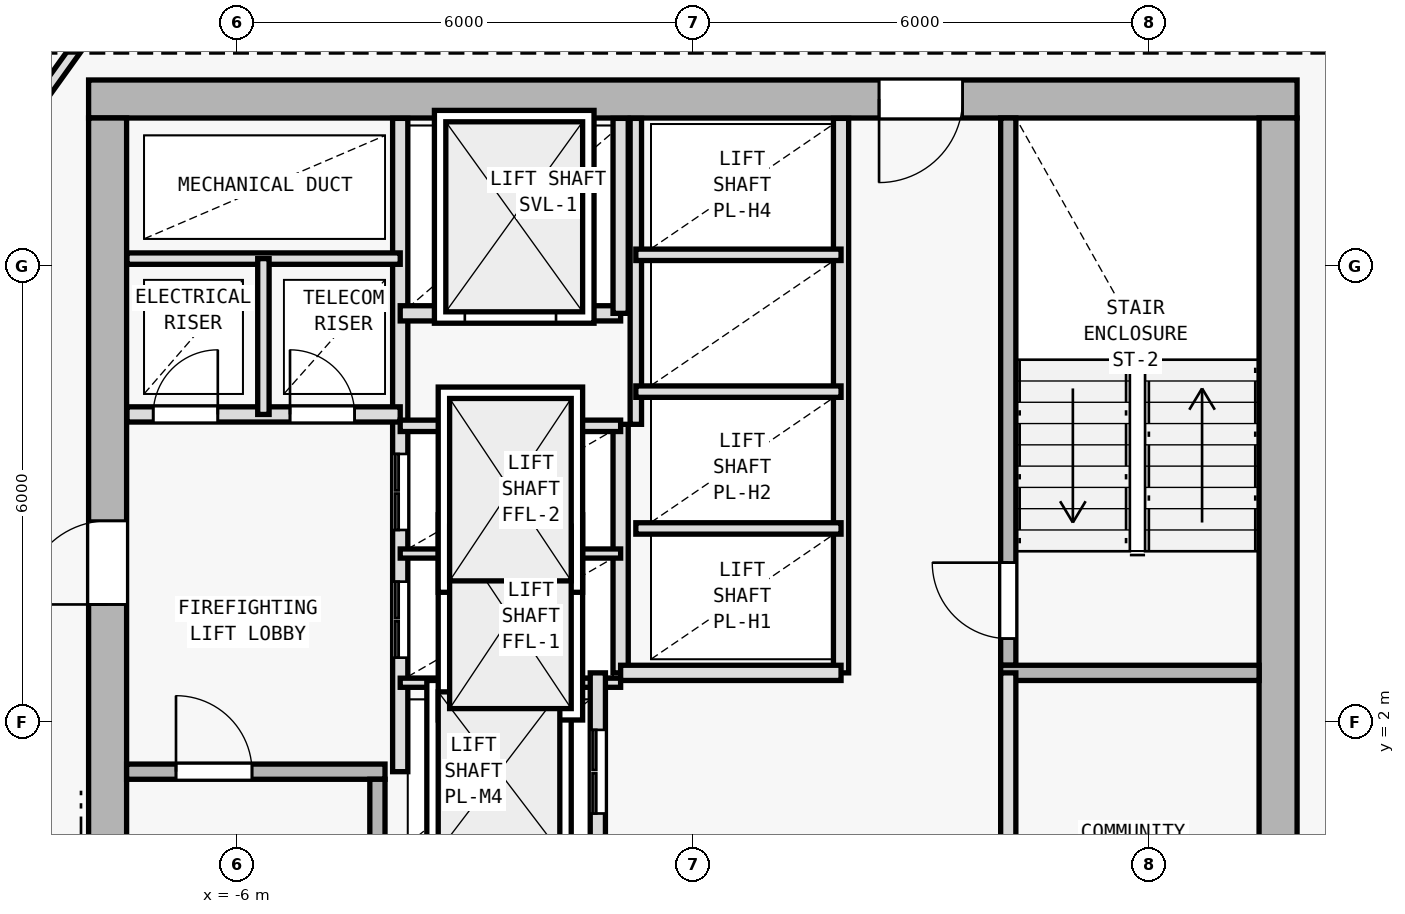
"""IFC4 building model, lengths in metres.
Left out: names, types, materials, properties, quantities, classifications, styles, units other than length and angle.
Written with IfcOpenShell. Run it as: python <this file> out.ifc"""

import sys

from ifc_helpers import new_model, si_unit, direction, frame, frame_2d, origin, origin_2d, place, context, subcontext, project, spatial, rectangle, i_section, extrude, element, fill, save


model = new_model("IFC4")
c1 = context("Model", 3, precision=1e-05, world=origin(), true_north=direction((0.0, 1.0)))
c2 = subcontext(c1, "Body", "Model", "MODEL_VIEW")
j1 = project(units=[si_unit("LENGTHUNIT", "METRE"), si_unit("PLANEANGLEUNIT", "RADIAN")], contexts=[c1])
p1 = place(None, origin())
s1 = spatial("IfcSite", under=j1, at=p1, CompositionType="ELEMENT")
p2 = place(p1, origin())
s2 = spatial("IfcBuilding", under=s1, at=p2, CompositionType="ELEMENT")
p3 = place(p2, frame((0.0, 0.0, 142.2)))
s3 = spatial("IfcBuildingStorey", under=s2, at=p3, CompositionType="ELEMENT", Elevation=142.2)
for number, where, z_axis, x_axis in (
    (1, (7.7, 10.2, 0.0), (0.0, 0.0, 1.0), (1.0, 0.0, 0.0)),
    (2, (-7.7, 10.2, 0.0), (0.0, 0.0, 1.0), (1.0, 0.0, 0.0)),
    (3, (7.7, 0.4, 0.0), (0.0, 0.0, 1.0), (1.0, 0.0, 0.0)),
    (4, (-7.7, 2.0, 0.0), (0.0, 0.0, 1.0), (1.0, 0.0, 0.0)),
):
    element("IfcColumn", number, at=place(p3, frame(where, z_axis=z_axis, x_axis=x_axis)), inside=s3, PredefinedType="COLUMN", context=c2, shape_type="SweptSolid", body=[
        extrude(i_section(OverallWidth=0.404, OverallDepth=0.407, WebThickness=0.017, FlangeThickness=0.028, FilletRadius=0.015, at=origin_2d()), origin(), (0.0, 0.0, 1.0), 3.6),
    ])
p4 = place(p3, frame((7.95, 10.2, 0.0), z_axis=(0.0, 0.0, 1.0), x_axis=(-1.0, 0.0, 0.0)))
e5 = element("IfcWall", 5, at=p4, inside=s3, PredefinedType="SHEAR", context=c2, shape_type="SweptSolid", body=[
    extrude(rectangle(XDim=15.9, YDim=0.5, at=frame_2d((7.95, 0.0))), origin(), (0.0, 0.0, 1.0), 3.35),
])
p5 = place(p4, frame((4.4, 0.0, 0.0)))
e6 = element("IfcOpeningElement", 6, at=p5, cuts=e5, PredefinedType="OPENING", context=c2, shape_type="SweptSolid", body=[
    extrude(rectangle(XDim=1.1, YDim=2.15, at=frame_2d((0.55, 1.075))), frame((0.0, 0.26, 0.0), z_axis=(0.0, -1.0, 0.0), x_axis=(1.0, 0.0, 0.0)), (0.0, 0.0, 1.0), 0.52),
])
p6 = place(p3, frame((-7.7, -9.15, 0.0), z_axis=(0.0, 0.0, 1.0), x_axis=(0.0, 1.0, 0.0)))
e7 = element("IfcWall", 7, at=p6, inside=s3, PredefinedType="SHEAR", context=c2, shape_type="SweptSolid", body=[
    extrude(rectangle(XDim=19.1, YDim=0.5, at=frame_2d((9.55, 0.0))), origin(), (0.0, 0.0, 1.0), 3.35),
])
p7 = place(p6, frame((12.7, 0.0, 0.0)))
e8 = element("IfcOpeningElement", 8, at=p7, cuts=e7, PredefinedType="OPENING", context=c2, shape_type="SweptSolid", body=[
    extrude(rectangle(XDim=1.1, YDim=2.15, at=frame_2d((0.55, 1.075))), frame((0.0, 0.26, 0.0), z_axis=(0.0, -1.0, 0.0), x_axis=(1.0, 0.0, 0.0)), (0.0, 0.0, 1.0), 0.52),
])
p8 = place(p3, frame((7.7, 9.95, 0.0), z_axis=(0.0, 0.0, 1.0), x_axis=(0.0, -1.0, 0.0)))
e9 = element("IfcWall", 9, at=p8, inside=s3, PredefinedType="SHEAR", context=c2, shape_type="SweptSolid", body=[
    extrude(rectangle(XDim=19.1, YDim=0.5, at=frame_2d((9.55, 0.0))), origin(), (0.0, 0.0, 1.0), 3.35),
])
p9 = place(p3, frame((-7.45, 1.35, 0.0), z_axis=(0.0, 0.0, 1.0), x_axis=(1.0, 0.0, 0.0)))
e10 = element("IfcWall", 10, at=p9, inside=s3, PredefinedType="SOLIDWALL", context=c2, shape_type="SweptSolid", body=[
    extrude(rectangle(XDim=3.4, YDim=0.2, at=frame_2d((1.7, 0.0))), origin(), (0.0, 0.0, 1.0), 3.35),
])
p10 = place(p9, frame((0.65, 0.0, 0.0)))
e11 = element("IfcOpeningElement", 11, at=p10, cuts=e10, PredefinedType="OPENING", context=c2, shape_type="SweptSolid", body=[
    extrude(rectangle(XDim=1.0, YDim=2.15, at=frame_2d((0.5, 1.075))), frame((0.0, 0.11, 0.0), z_axis=(0.0, -1.0, 0.0), x_axis=(1.0, 0.0, 0.0)), (0.0, 0.0, 1.0), 0.22),
])
p11 = place(p3, frame((-4.15, -5.95, 0.0), z_axis=(0.0, 0.0, 1.0), x_axis=(0.0, 1.0, 0.0)))
e12 = element("IfcWall", 12, at=p11, inside=s3, PredefinedType="SOLIDWALL", context=c2, shape_type="SweptSolid", body=[
    extrude(rectangle(XDim=7.2, YDim=0.2, at=frame_2d((3.6, 0.0))), origin(), (0.0, 0.0, 1.0), 3.35),
])
p12 = place(p3, frame((-3.85, 1.35, 0.0), z_axis=(0.0, 0.0, 1.0), x_axis=(0.0, 1.0, 0.0)))
e13 = element("IfcWall", 13, at=p12, inside=s3, PredefinedType="SOLIDWALL", context=c2, shape_type="SweptSolid", body=[
    extrude(rectangle(XDim=8.595, YDim=0.2, at=frame_2d((4.297, 0.0))), origin(), (0.0, 0.0, 1.0), 3.35),
])
p13 = place(p12, frame((1.5, 0.0, 0.0)))
e14 = element("IfcOpeningElement", 14, at=p13, cuts=e13, PredefinedType="OPENING", context=c2, shape_type="SweptSolid", body=[
    extrude(rectangle(XDim=1.0, YDim=2.15, at=frame_2d((0.5, 1.075))), frame((0.0, 0.11, 0.0), z_axis=(0.0, -1.0, 0.0), x_axis=(1.0, 0.0, 0.0)), (0.0, 0.0, 1.0), 0.22),
])
p14 = place(p12, frame((3.18, 0.0, 0.0)))
e15 = element("IfcOpeningElement", 15, at=p14, cuts=e13, PredefinedType="OPENING", context=c2, shape_type="SweptSolid", body=[
    extrude(rectangle(XDim=1.0, YDim=2.15, at=frame_2d((0.5, 1.075))), frame((0.0, 0.11, 0.0), z_axis=(0.0, -1.0, 0.0), x_axis=(1.0, 0.0, 0.0)), (0.0, 0.0, 1.0), 0.22),
])
p15 = place(p3, frame((-7.445, 6.05, 0.0), z_axis=(0.0, 0.0, 1.0), x_axis=(1.0, 0.0, 0.0)))
e16 = element("IfcWall", 16, at=p15, inside=s3, PredefinedType="SOLIDWALL", context=c2, shape_type="SweptSolid", body=[
    extrude(rectangle(XDim=3.595, YDim=0.2, at=frame_2d((1.797, 0.0))), origin(), (0.0, 0.0, 1.0), 3.35),
])
p16 = place(p15, frame((0.345, 0.0, 0.0)))
e17 = element("IfcOpeningElement", 17, at=p16, cuts=e16, PredefinedType="OPENING", context=c2, shape_type="SweptSolid", body=[
    extrude(rectangle(XDim=0.85, YDim=2.1, at=frame_2d((0.425, 1.05))), frame((0.0, 0.11, 0.0), z_axis=(0.0, -1.0, 0.0), x_axis=(1.0, 0.0, 0.0)), (0.0, 0.0, 1.0), 0.22),
])
p17 = place(p15, frame((2.145, 0.0, 0.0)))
e18 = element("IfcOpeningElement", 18, at=p17, cuts=e16, PredefinedType="OPENING", context=c2, shape_type="SweptSolid", body=[
    extrude(rectangle(XDim=0.85, YDim=2.1, at=frame_2d((0.425, 1.05))), frame((0.0, 0.11, 0.0), z_axis=(0.0, -1.0, 0.0), x_axis=(1.0, 0.0, 0.0)), (0.0, 0.0, 1.0), 0.22),
])
p18 = place(p3, frame((-7.445, 8.1, 0.0), z_axis=(0.0, 0.0, 1.0), x_axis=(1.0, 0.0, 0.0)))
e19 = element("IfcWall", 19, at=p18, inside=s3, PredefinedType="PARTITIONING", context=c2, shape_type="SweptSolid", body=[
    extrude(rectangle(XDim=3.595, YDim=0.15, at=frame_2d((1.797, 0.0))), origin(), (0.0, 0.0, 1.0), 3.35),
])
p19 = place(p3, frame((-5.65, 6.05, 0.0), z_axis=(0.0, 0.0, 1.0), x_axis=(0.0, 1.0, 0.0)))
e20 = element("IfcWall", 20, at=p19, inside=s3, PredefinedType="PARTITIONING", context=c2, shape_type="SweptSolid", body=[
    extrude(rectangle(XDim=2.05, YDim=0.15, at=frame_2d((1.025, 0.0))), origin(), (0.0, 0.0, 1.0), 3.35),
])
p20 = place(p3, frame((4.15, 2.75, 0.0), z_axis=(0.0, 0.0, 1.0), x_axis=(0.0, 1.0, 0.0)))
e21 = element("IfcWall", 21, at=p20, inside=s3, PredefinedType="SOLIDWALL", context=c2, shape_type="SweptSolid", body=[
    extrude(rectangle(XDim=7.2, YDim=0.2, at=frame_2d((3.6, 0.0))), origin(), (0.0, 0.0, 1.0), 3.35),
])
p21 = place(p20, frame((0.35, 0.0, 0.0)))
e22 = element("IfcOpeningElement", 22, at=p21, cuts=e21, PredefinedType="OPENING", context=c2, shape_type="SweptSolid", body=[
    extrude(rectangle(XDim=1.0, YDim=2.15, at=frame_2d((0.5, 1.075))), frame((0.0, 0.11, 0.0), z_axis=(0.0, -1.0, 0.0), x_axis=(1.0, 0.0, 0.0)), (0.0, 0.0, 1.0), 0.22),
])
p22 = place(p3, frame((4.05, 2.65, 0.0), z_axis=(0.0, 0.0, 1.0), x_axis=(1.0, 0.0, 0.0)))
e23 = element("IfcWall", 23, at=p22, inside=s3, PredefinedType="SOLIDWALL", context=c2, shape_type="SweptSolid", body=[
    extrude(rectangle(XDim=3.4, YDim=0.2, at=frame_2d((1.7, 0.0))), origin(), (0.0, 0.0, 1.0), 3.35),
])
p23 = place(p3, frame((-0.95, 2.65, 0.0), z_axis=(0.0, 0.0, 1.0), x_axis=(0.0, 1.0, 0.0)))
e24 = element("IfcWall", 24, at=p23, inside=s3, PredefinedType="SOLIDWALL", context=c2, shape_type="SweptSolid", body=[
    extrude(rectangle(XDim=3.27, YDim=0.2, at=frame_2d((1.635, 0.0))), origin(), (0.0, 0.0, 1.0), 3.35),
])
for number, where, z_axis, x_axis in (
    (25, (-3.85, 2.52, 0.0), (0.0, 0.0, 1.0), (1.0, 0.0, 0.0)),
    (26, (-3.85, 4.22, 0.0), (0.0, 0.0, 1.0), (1.0, 0.0, 0.0)),
):
    element("IfcWall", number, at=place(p3, frame(where, z_axis=z_axis, x_axis=x_axis)), inside=s3, PredefinedType="PARTITIONING", context=c2, shape_type="SweptSolid", body=[
        extrude(rectangle(XDim=2.9, YDim=0.12, at=frame_2d((1.45, 0.0))), origin(), (0.0, 0.0, 1.0), 3.35),
    ])
p24 = place(p3, frame((-3.85, 5.9, 0.0), z_axis=(0.0, 0.0, 1.0), x_axis=(1.0, 0.0, 0.0)))
e27 = element("IfcWall", 27, at=p24, inside=s3, PredefinedType="PARTITIONING", context=c2, shape_type="SweptSolid", body=[
    extrude(rectangle(XDim=2.9, YDim=0.15, at=frame_2d((1.45, 0.0))), origin(), (0.0, 0.0, 1.0), 3.35),
])
p25 = place(p3, frame((-3.85, 7.38, 0.0), z_axis=(0.0, 0.0, 1.0), x_axis=(1.0, 0.0, 0.0)))
e28 = element("IfcWall", 28, at=p25, inside=s3, PredefinedType="SOLIDWALL", context=c2, shape_type="SweptSolid", body=[
    extrude(rectangle(XDim=2.9, YDim=0.2, at=frame_2d((1.45, 0.0))), origin(), (0.0, 0.0, 1.0), 3.35),
])
p26 = place(p25, frame((0.85, 0.0, 0.0)))
e29 = element("IfcOpeningElement", 29, at=p26, cuts=e28, PredefinedType="OPENING", context=c2, shape_type="SweptSolid", body=[
    extrude(rectangle(XDim=1.2, YDim=2.2, at=frame_2d((0.6, 1.1))), frame((0.0, 0.11, 0.0), z_axis=(0.0, -1.0, 0.0), x_axis=(1.0, 0.0, 0.0)), (0.0, 0.0, 1.0), 0.22),
])
p27 = place(p3, frame((-0.95, 7.38, 0.0), z_axis=(0.0, 0.0, 1.0), x_axis=(0.0, 1.0, 0.0)))
e30 = element("IfcWall", 30, at=p27, inside=s3, PredefinedType="SOLIDWALL", context=c2, shape_type="SweptSolid", body=[
    extrude(rectangle(XDim=2.565, YDim=0.2, at=frame_2d((1.283, 0.0))), origin(), (0.0, 0.0, 1.0), 3.35),
])
p28 = place(p3, frame((4.15, -6.05, 0.0), z_axis=(0.0, 0.0, 1.0), x_axis=(0.0, 1.0, 0.0)))
e31 = element("IfcWall", 31, at=p28, inside=s3, PredefinedType="SOLIDWALL", context=c2, shape_type="SweptSolid", body=[
    extrude(rectangle(XDim=8.7, YDim=0.2, at=frame_2d((4.35, 0.0))), origin(), (0.0, 0.0, 1.0), 3.35),
])
p29 = place(p28, frame((3.6, 0.0, 0.0)))
e32 = element("IfcOpeningElement", 32, at=p29, cuts=e31, PredefinedType="OPENING", context=c2, shape_type="SweptSolid", body=[
    extrude(rectangle(XDim=0.95, YDim=2.1, at=frame_2d((0.475, 1.05))), frame((0.0, 0.11, 0.0), z_axis=(0.0, -1.0, 0.0), x_axis=(1.0, 0.0, 0.0)), (0.0, 0.0, 1.0), 0.22),
])
p30 = place(p3, frame((-1.25, -6.05, 0.0), z_axis=(0.0, 0.0, 1.0), x_axis=(0.0, 1.0, 0.0)))
e33 = element("IfcWall", 33, at=p30, inside=s3, PredefinedType="SOLIDWALL", context=c2, shape_type="SweptSolid", body=[
    extrude(rectangle(XDim=8.7, YDim=0.2, at=frame_2d((4.35, 0.0))), origin(), (0.0, 0.0, 1.0), 3.35),
])
p31 = place(p30, frame((0.55, 0.0, 0.0)))
e34 = element("IfcOpeningElement", 34, at=p31, cuts=e33, PredefinedType="OPENING", context=c2, shape_type="SweptSolid", body=[
    extrude(rectangle(XDim=1.1, YDim=2.15, at=frame_2d((0.55, 1.075))), frame((0.0, 0.11, 0.0), z_axis=(0.0, -1.0, 0.0), x_axis=(1.0, 0.0, 0.0)), (0.0, 0.0, 1.0), 0.22),
])
p32 = place(p30, frame((2.65, 0.0, 0.0)))
e35 = element("IfcOpeningElement", 35, at=p32, cuts=e33, PredefinedType="OPENING", context=c2, shape_type="SweptSolid", body=[
    extrude(rectangle(XDim=1.1, YDim=2.15, at=frame_2d((0.55, 1.075))), frame((0.0, 0.11, 0.0), z_axis=(0.0, -1.0, 0.0), x_axis=(1.0, 0.0, 0.0)), (0.0, 0.0, 1.0), 0.22),
])
p33 = place(p30, frame((4.75, 0.0, 0.0)))
e36 = element("IfcOpeningElement", 36, at=p33, cuts=e33, PredefinedType="OPENING", context=c2, shape_type="SweptSolid", body=[
    extrude(rectangle(XDim=1.1, YDim=2.15, at=frame_2d((0.55, 1.075))), frame((0.0, 0.11, 0.0), z_axis=(0.0, -1.0, 0.0), x_axis=(1.0, 0.0, 0.0)), (0.0, 0.0, 1.0), 0.22),
])
p34 = place(p30, frame((6.85, 0.0, 0.0)))
e37 = element("IfcOpeningElement", 37, at=p34, cuts=e33, PredefinedType="OPENING", context=c2, shape_type="SweptSolid", body=[
    extrude(rectangle(XDim=1.1, YDim=2.15, at=frame_2d((0.55, 1.075))), frame((0.0, 0.11, 0.0), z_axis=(0.0, -1.0, 0.0), x_axis=(1.0, 0.0, 0.0)), (0.0, 0.0, 1.0), 0.22),
])
p35 = place(p3, frame((1.95, 2.65, 0.0), z_axis=(0.0, 0.0, 1.0), x_axis=(0.0, 1.0, 0.0)))
e38 = element("IfcWall", 38, at=p35, inside=s3, PredefinedType="SOLIDWALL", context=c2, shape_type="SweptSolid", body=[
    extrude(rectangle(XDim=7.295, YDim=0.2, at=frame_2d((3.647, 0.0))), origin(), (0.0, 0.0, 1.0), 3.35),
])
p36 = place(p3, frame((-0.95, 2.65, 0.0), z_axis=(0.0, 0.0, 1.0), x_axis=(1.0, 0.0, 0.0)))
e39 = element("IfcWall", 39, at=p36, inside=s3, PredefinedType="SOLIDWALL", context=c2, shape_type="SweptSolid", body=[
    extrude(rectangle(XDim=2.9, YDim=0.2, at=frame_2d((1.45, 0.0))), origin(), (0.0, 0.0, 1.0), 3.35),
])
p37 = place(p3, frame((-0.75, 5.92, 0.0), z_axis=(0.0, 0.0, 1.0), x_axis=(0.0, 1.0, 0.0)))
e40 = element("IfcWall", 40, at=p37, inside=s3, PredefinedType="PARTITIONING", context=c2, shape_type="SweptSolid", body=[
    extrude(rectangle(XDim=4.025, YDim=0.15, at=frame_2d((2.013, 0.0))), origin(), (0.0, 0.0, 1.0), 3.35),
])
for number, where, z_axis, x_axis in (
    (41, (-0.75, 4.55, 0.0), (0.0, 0.0, 1.0), (1.0, 0.0, 0.0)),
    (42, (-0.75, 6.35, 0.0), (0.0, 0.0, 1.0), (1.0, 0.0, 0.0)),
    (43, (-0.75, 8.15, 0.0), (0.0, 0.0, 1.0), (1.0, 0.0, 0.0)),
):
    element("IfcWall", number, at=place(p3, frame(where, z_axis=z_axis, x_axis=x_axis)), inside=s3, PredefinedType="PARTITIONING", context=c2, shape_type="SweptSolid", body=[
        extrude(rectangle(XDim=2.7, YDim=0.15, at=frame_2d((1.35, 0.0))), origin(), (0.0, 0.0, 1.0), 3.35),
    ])
p38 = place(p3, frame((-9.86, 8.426, 0.0), z_axis=(0.0, 0.0, 1.0), x_axis=(0.582449511476, 0.812866881218, 0.0)))
e44 = element("IfcWall", 44, at=p38, inside=s3, PredefinedType="PARTITIONING", context=c2, shape_type="SweptSolid", body=[
    extrude(rectangle(XDim=4.84, YDim=0.15, at=frame_2d((2.42, 0.0))), origin(), (0.0, 0.0, 1.0), 2.965),
])
p39 = place(p3, frame((7.023, 12.36, 0.0), z_axis=(0.0, 0.0, 1.0), x_axis=(0.84376480085, -0.536713108511, 0.0)))
e45 = element("IfcWall", 45, at=p39, inside=s3, PredefinedType="PARTITIONING", context=c2, shape_type="SweptSolid", body=[
    extrude(rectangle(XDim=7.297, YDim=0.15, at=frame_2d((3.648, 0.0))), origin(), (0.0, 0.0, 1.0), 2.885),
])
p40 = place(p39, frame((3.091, 0.0, 0.0)))
e46 = element("IfcOpeningElement", 46, at=p40, cuts=e45, PredefinedType="OPENING", context=c2, shape_type="SweptSolid", body=[
    extrude(rectangle(XDim=0.9, YDim=2.1, at=frame_2d((0.45, 1.05))), frame((0.0, 0.085, 0.0), z_axis=(0.0, -1.0, 0.0), x_axis=(1.0, 0.0, 0.0)), (0.0, 0.0, 1.0), 0.17),
])
p41 = place(p7, origin())
e47 = element("IfcDoor", 47, at=p41, inside=s3, OperationType="SINGLE_SWING_LEFT", PredefinedType="DOOR", context=c2, shape_type="SweptSolid", body=[
    extrude(rectangle(XDim=1.1, YDim=2.15, at=frame_2d((0.55, 1.075))), frame((0.0, 0.025, 0.0), z_axis=(0.0, -1.0, 0.0), x_axis=(1.0, 0.0, 0.0)), (0.0, 0.0, 1.0), 0.05),
])
fill(e8, e47)
p42 = place(p5, origin())
e48 = element("IfcDoor", 48, at=p42, inside=s3, OperationType="SINGLE_SWING_RIGHT", PredefinedType="DOOR", context=c2, shape_type="SweptSolid", body=[
    extrude(rectangle(XDim=1.1, YDim=2.15, at=frame_2d((0.55, 1.075))), frame((0.0, 0.025, 0.0), z_axis=(0.0, -1.0, 0.0), x_axis=(1.0, 0.0, 0.0)), (0.0, 0.0, 1.0), 0.05),
])
fill(e6, e48)
p43 = place(p10, origin())
e49 = element("IfcDoor", 49, at=p43, inside=s3, OperationType="SINGLE_SWING_LEFT", PredefinedType="DOOR", context=c2, shape_type="SweptSolid", body=[
    extrude(rectangle(XDim=1.0, YDim=2.15, at=frame_2d((0.5, 1.075))), frame((0.0, 0.025, 0.0), z_axis=(0.0, -1.0, 0.0), x_axis=(1.0, 0.0, 0.0)), (0.0, 0.0, 1.0), 0.05),
])
fill(e11, e49)
p44 = place(p16, origin())
e50 = element("IfcDoor", 50, at=p44, inside=s3, OperationType="SINGLE_SWING_RIGHT", PredefinedType="DOOR", context=c2, shape_type="SweptSolid", body=[
    extrude(rectangle(XDim=0.85, YDim=2.1, at=frame_2d((0.425, 1.05))), frame((0.0, 0.025, 0.0), z_axis=(0.0, -1.0, 0.0), x_axis=(1.0, 0.0, 0.0)), (0.0, 0.0, 1.0), 0.05),
])
fill(e17, e50)
p45 = place(p17, origin())
e51 = element("IfcDoor", 51, at=p45, inside=s3, OperationType="SINGLE_SWING_LEFT", PredefinedType="DOOR", context=c2, shape_type="SweptSolid", body=[
    extrude(rectangle(XDim=0.85, YDim=2.1, at=frame_2d((0.425, 1.05))), frame((0.0, 0.025, 0.0), z_axis=(0.0, -1.0, 0.0), x_axis=(1.0, 0.0, 0.0)), (0.0, 0.0, 1.0), 0.05),
])
fill(e18, e51)
p46 = place(p21, origin())
e52 = element("IfcDoor", 52, at=p46, inside=s3, OperationType="SINGLE_SWING_RIGHT", PredefinedType="DOOR", context=c2, shape_type="SweptSolid", body=[
    extrude(rectangle(XDim=1.0, YDim=2.15, at=frame_2d((0.5, 1.075))), frame((0.0, 0.025, 0.0), z_axis=(0.0, -1.0, 0.0), x_axis=(1.0, 0.0, 0.0)), (0.0, 0.0, 1.0), 0.05),
])
fill(e22, e52)
p47 = place(p26, origin())
e53 = element("IfcDoor", 53, at=p47, inside=s3, OperationType="DOUBLE_DOOR_SLIDING", PredefinedType="DOOR", context=c2, shape_type="SweptSolid", body=[
    extrude(rectangle(XDim=1.2, YDim=2.2, at=frame_2d((0.6, 1.1))), frame((0.0, 0.025, 0.0), z_axis=(0.0, -1.0, 0.0), x_axis=(1.0, 0.0, 0.0)), (0.0, 0.0, 1.0), 0.05),
])
fill(e29, e53)
p48 = place(p34, origin())
e54 = element("IfcDoor", 54, at=p48, inside=s3, OperationType="DOUBLE_DOOR_SLIDING", PredefinedType="DOOR", context=c2, shape_type="SweptSolid", body=[
    extrude(rectangle(XDim=1.1, YDim=2.15, at=frame_2d((0.55, 1.075))), frame((0.0, 0.025, 0.0), z_axis=(0.0, -1.0, 0.0), x_axis=(1.0, 0.0, 0.0)), (0.0, 0.0, 1.0), 0.05),
])
fill(e37, e54)
p49 = place(p13, origin())
e55 = element("IfcDoor", 55, at=p49, inside=s3, OperationType="DOUBLE_DOOR_SLIDING", PredefinedType="DOOR", context=c2, shape_type="SweptSolid", body=[
    extrude(rectangle(XDim=1.0, YDim=2.15, at=frame_2d((0.5, 1.075))), frame((0.0, 0.025, 0.0), z_axis=(0.0, -1.0, 0.0), x_axis=(1.0, 0.0, 0.0)), (0.0, 0.0, 1.0), 0.05),
])
fill(e14, e55)
p50 = place(p14, origin())
e56 = element("IfcDoor", 56, at=p50, inside=s3, OperationType="DOUBLE_DOOR_SLIDING", PredefinedType="DOOR", context=c2, shape_type="SweptSolid", body=[
    extrude(rectangle(XDim=1.0, YDim=2.15, at=frame_2d((0.5, 1.075))), frame((0.0, 0.025, 0.0), z_axis=(0.0, -1.0, 0.0), x_axis=(1.0, 0.0, 0.0)), (0.0, 0.0, 1.0), 0.05),
])
fill(e15, e56)
save(model, sys.argv[1])
